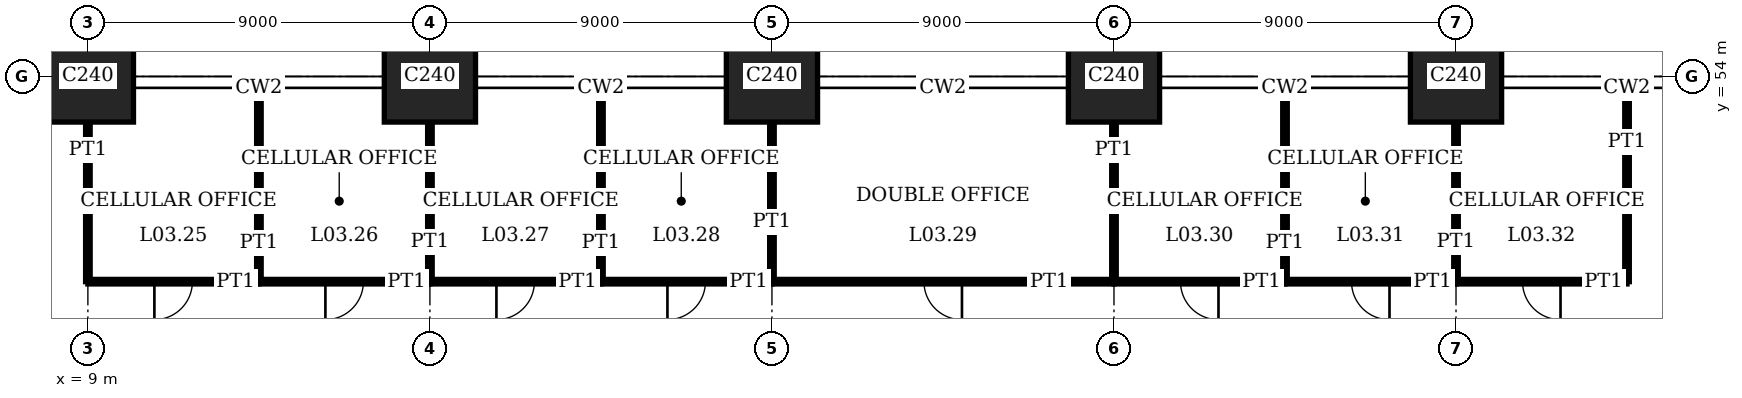
"""IFC4 building model, lengths in metres.
Left out: names, types, materials, properties, quantities, classifications, styles, units other than length and angle.
Written with IfcOpenShell. Run it as: python <this file> out.ifc"""

import sys

from ifc_helpers import new_model, si_unit, direction, frame, frame_2d, origin, origin_2d, place, context, subcontext, project, spatial, rectangle, extrude, element, fill, save


model = new_model("IFC4")
c1 = context("Model", 3, precision=1e-05, world=origin(), true_north=direction((0.0, 1.0)))
c2 = subcontext(c1, "Body", "Model", "MODEL_VIEW")
j1 = project(units=[si_unit("LENGTHUNIT", "METRE"), si_unit("PLANEANGLEUNIT", "RADIAN")], contexts=[c1])
p1 = place(None, origin())
s1 = spatial("IfcSite", under=j1, at=p1, CompositionType="ELEMENT")
p2 = place(p1, origin())
s2 = spatial("IfcBuilding", under=s1, at=p2, CompositionType="ELEMENT")
p3 = place(p2, frame((0.0, 0.0, 15.8)))
s3 = spatial("IfcBuildingStorey", under=s2, at=p3, CompositionType="ELEMENT", Elevation=15.8)
for number, where, z_axis, x_axis in (
    (1, (9.0, 54.0, 0.0), (0.0, 0.0, 1.0), (1.0, 0.0, 0.0)),
    (2, (18.0, 54.0, 0.0), (0.0, 0.0, 1.0), (1.0, 0.0, 0.0)),
    (3, (27.0, 54.0, 0.0), (0.0, 0.0, 1.0), (1.0, 0.0, 0.0)),
    (4, (36.0, 54.0, 0.0), (0.0, 0.0, 1.0), (1.0, 0.0, 0.0)),
    (5, (45.0, 54.0, 0.0), (0.0, 0.0, 1.0), (1.0, 0.0, 0.0)),
):
    element("IfcColumn", number, at=place(p3, frame(where, z_axis=z_axis, x_axis=x_axis)), inside=s3, PredefinedType="COLUMN", context=c2, shape_type="SweptSolid", body=[
        extrude(rectangle(XDim=2.4, YDim=2.4, at=origin_2d()), origin(), (0.0, 0.0, 1.0), 4.0),
    ])
p4 = place(p3, frame((9.0, 48.6, 0.0), z_axis=(0.0, 0.0, 1.0), x_axis=(1.0, 0.0, 0.0)))
e6 = element("IfcWall", 6, at=p4, inside=s3, PredefinedType="PARTITIONING", context=c2, shape_type="SweptSolid", body=[
    extrude(rectangle(XDim=4.5, YDim=0.12, at=frame_2d((2.25, 0.0))), origin(), (0.0, 0.0, 1.0), 3.75),
])
p5 = place(p4, frame((1.75, 0.0, 0.0)))
e7 = element("IfcOpeningElement", 7, at=p5, cuts=e6, PredefinedType="OPENING", context=c2, shape_type="SweptSolid", body=[
    extrude(rectangle(XDim=1.0, YDim=2.4, at=frame_2d((0.5, 1.2))), frame((0.0, 0.07, 0.0), z_axis=(0.0, -1.0, 0.0), x_axis=(1.0, 0.0, 0.0)), (0.0, 0.0, 1.0), 0.14),
])
p6 = place(p3, frame((13.5, 48.6, 0.0), z_axis=(0.0, 0.0, 1.0), x_axis=(1.0, 0.0, 0.0)))
e8 = element("IfcWall", 8, at=p6, inside=s3, PredefinedType="PARTITIONING", context=c2, shape_type="SweptSolid", body=[
    extrude(rectangle(XDim=4.5, YDim=0.12, at=frame_2d((2.25, 0.0))), origin(), (0.0, 0.0, 1.0), 3.75),
])
p7 = place(p6, frame((1.75, 0.0, 0.0)))
e9 = element("IfcOpeningElement", 9, at=p7, cuts=e8, PredefinedType="OPENING", context=c2, shape_type="SweptSolid", body=[
    extrude(rectangle(XDim=1.0, YDim=2.4, at=frame_2d((0.5, 1.2))), frame((0.0, 0.07, 0.0), z_axis=(0.0, -1.0, 0.0), x_axis=(1.0, 0.0, 0.0)), (0.0, 0.0, 1.0), 0.14),
])
p8 = place(p3, frame((18.0, 48.6, 0.0), z_axis=(0.0, 0.0, 1.0), x_axis=(1.0, 0.0, 0.0)))
e10 = element("IfcWall", 10, at=p8, inside=s3, PredefinedType="PARTITIONING", context=c2, shape_type="SweptSolid", body=[
    extrude(rectangle(XDim=4.5, YDim=0.12, at=frame_2d((2.25, 0.0))), origin(), (0.0, 0.0, 1.0), 3.75),
])
p9 = place(p8, frame((1.75, 0.0, 0.0)))
e11 = element("IfcOpeningElement", 11, at=p9, cuts=e10, PredefinedType="OPENING", context=c2, shape_type="SweptSolid", body=[
    extrude(rectangle(XDim=1.0, YDim=2.4, at=frame_2d((0.5, 1.2))), frame((0.0, 0.07, 0.0), z_axis=(0.0, -1.0, 0.0), x_axis=(1.0, 0.0, 0.0)), (0.0, 0.0, 1.0), 0.14),
])
p10 = place(p3, frame((22.5, 48.6, 0.0), z_axis=(0.0, 0.0, 1.0), x_axis=(1.0, 0.0, 0.0)))
e12 = element("IfcWall", 12, at=p10, inside=s3, PredefinedType="PARTITIONING", context=c2, shape_type="SweptSolid", body=[
    extrude(rectangle(XDim=4.5, YDim=0.12, at=frame_2d((2.25, 0.0))), origin(), (0.0, 0.0, 1.0), 3.75),
])
p11 = place(p10, frame((1.75, 0.0, 0.0)))
e13 = element("IfcOpeningElement", 13, at=p11, cuts=e12, PredefinedType="OPENING", context=c2, shape_type="SweptSolid", body=[
    extrude(rectangle(XDim=1.0, YDim=2.4, at=frame_2d((0.5, 1.2))), frame((0.0, 0.07, 0.0), z_axis=(0.0, -1.0, 0.0), x_axis=(1.0, 0.0, 0.0)), (0.0, 0.0, 1.0), 0.14),
])
p12 = place(p3, frame((27.0, 48.6, 0.0), z_axis=(0.0, 0.0, 1.0), x_axis=(1.0, 0.0, 0.0)))
e14 = element("IfcWall", 14, at=p12, inside=s3, PredefinedType="PARTITIONING", context=c2, shape_type="SweptSolid", body=[
    extrude(rectangle(XDim=9.0, YDim=0.12, at=frame_2d((4.5, 0.0))), origin(), (0.0, 0.0, 1.0), 3.75),
])
p13 = place(p12, frame((4.0, 0.0, 0.0)))
e15 = element("IfcOpeningElement", 15, at=p13, cuts=e14, PredefinedType="OPENING", context=c2, shape_type="SweptSolid", body=[
    extrude(rectangle(XDim=1.0, YDim=2.4, at=frame_2d((0.5, 1.2))), frame((0.0, 0.07, 0.0), z_axis=(0.0, -1.0, 0.0), x_axis=(1.0, 0.0, 0.0)), (0.0, 0.0, 1.0), 0.14),
])
p14 = place(p3, frame((36.0, 48.6, 0.0), z_axis=(0.0, 0.0, 1.0), x_axis=(1.0, 0.0, 0.0)))
e16 = element("IfcWall", 16, at=p14, inside=s3, PredefinedType="PARTITIONING", context=c2, shape_type="SweptSolid", body=[
    extrude(rectangle(XDim=4.5, YDim=0.12, at=frame_2d((2.25, 0.0))), origin(), (0.0, 0.0, 1.0), 3.75),
])
p15 = place(p14, frame((1.75, 0.0, 0.0)))
e17 = element("IfcOpeningElement", 17, at=p15, cuts=e16, PredefinedType="OPENING", context=c2, shape_type="SweptSolid", body=[
    extrude(rectangle(XDim=1.0, YDim=2.4, at=frame_2d((0.5, 1.2))), frame((0.0, 0.07, 0.0), z_axis=(0.0, -1.0, 0.0), x_axis=(1.0, 0.0, 0.0)), (0.0, 0.0, 1.0), 0.14),
])
p16 = place(p3, frame((40.5, 48.6, 0.0), z_axis=(0.0, 0.0, 1.0), x_axis=(1.0, 0.0, 0.0)))
e18 = element("IfcWall", 18, at=p16, inside=s3, PredefinedType="PARTITIONING", context=c2, shape_type="SweptSolid", body=[
    extrude(rectangle(XDim=4.5, YDim=0.12, at=frame_2d((2.25, 0.0))), origin(), (0.0, 0.0, 1.0), 3.75),
])
p17 = place(p16, frame((1.75, 0.0, 0.0)))
e19 = element("IfcOpeningElement", 19, at=p17, cuts=e18, PredefinedType="OPENING", context=c2, shape_type="SweptSolid", body=[
    extrude(rectangle(XDim=1.0, YDim=2.4, at=frame_2d((0.5, 1.2))), frame((0.0, 0.07, 0.0), z_axis=(0.0, -1.0, 0.0), x_axis=(1.0, 0.0, 0.0)), (0.0, 0.0, 1.0), 0.14),
])
p18 = place(p3, frame((45.0, 48.6, 0.0), z_axis=(0.0, 0.0, 1.0), x_axis=(1.0, 0.0, 0.0)))
e20 = element("IfcWall", 20, at=p18, inside=s3, PredefinedType="PARTITIONING", context=c2, shape_type="SweptSolid", body=[
    extrude(rectangle(XDim=4.5, YDim=0.12, at=frame_2d((2.25, 0.0))), origin(), (0.0, 0.0, 1.0), 3.75),
])
p19 = place(p18, frame((1.75, 0.0, 0.0)))
e21 = element("IfcOpeningElement", 21, at=p19, cuts=e20, PredefinedType="OPENING", context=c2, shape_type="SweptSolid", body=[
    extrude(rectangle(XDim=1.0, YDim=2.4, at=frame_2d((0.5, 1.2))), frame((0.0, 0.07, 0.0), z_axis=(0.0, -1.0, 0.0), x_axis=(1.0, 0.0, 0.0)), (0.0, 0.0, 1.0), 0.14),
])
p20 = place(p3, frame((9.0, 48.6, 0.0), z_axis=(0.0, 0.0, 1.0), x_axis=(0.0, 1.0, 0.0)))
e22 = element("IfcWall", 22, at=p20, inside=s3, PredefinedType="PARTITIONING", context=c2, shape_type="SweptSolid", body=[
    extrude(rectangle(XDim=4.2, YDim=0.12, at=frame_2d((2.1, 0.0))), origin(), (0.0, 0.0, 1.0), 3.05),
])
p21 = place(p3, frame((13.5, 48.6, 0.0), z_axis=(0.0, 0.0, 1.0), x_axis=(0.0, 1.0, 0.0)))
e23 = element("IfcWall", 23, at=p21, inside=s3, PredefinedType="PARTITIONING", context=c2, shape_type="SweptSolid", body=[
    extrude(rectangle(XDim=5.09, YDim=0.12, at=frame_2d((2.545, 0.0))), origin(), (0.0, 0.0, 1.0), 3.75),
])
p22 = place(p3, frame((18.0, 48.6, 0.0), z_axis=(0.0, 0.0, 1.0), x_axis=(0.0, 1.0, 0.0)))
e24 = element("IfcWall", 24, at=p22, inside=s3, PredefinedType="PARTITIONING", context=c2, shape_type="SweptSolid", body=[
    extrude(rectangle(XDim=4.2, YDim=0.12, at=frame_2d((2.1, 0.0))), origin(), (0.0, 0.0, 1.0), 3.05),
])
p23 = place(p3, frame((22.5, 48.6, 0.0), z_axis=(0.0, 0.0, 1.0), x_axis=(0.0, 1.0, 0.0)))
e25 = element("IfcWall", 25, at=p23, inside=s3, PredefinedType="PARTITIONING", context=c2, shape_type="SweptSolid", body=[
    extrude(rectangle(XDim=5.09, YDim=0.12, at=frame_2d((2.545, 0.0))), origin(), (0.0, 0.0, 1.0), 3.75),
])
for number, where, z_axis, x_axis in (
    (26, (27.0, 48.6, 0.0), (0.0, 0.0, 1.0), (0.0, 1.0, 0.0)),
    (27, (36.0, 48.6, 0.0), (0.0, 0.0, 1.0), (0.0, 1.0, 0.0)),
):
    element("IfcWall", number, at=place(p3, frame(where, z_axis=z_axis, x_axis=x_axis)), inside=s3, PredefinedType="PARTITIONING", context=c2, shape_type="SweptSolid", body=[
        extrude(rectangle(XDim=4.2, YDim=0.12, at=frame_2d((2.1, 0.0))), origin(), (0.0, 0.0, 1.0), 3.05),
    ])
p24 = place(p3, frame((40.5, 48.6, 0.0), z_axis=(0.0, 0.0, 1.0), x_axis=(0.0, 1.0, 0.0)))
e28 = element("IfcWall", 28, at=p24, inside=s3, PredefinedType="PARTITIONING", context=c2, shape_type="SweptSolid", body=[
    extrude(rectangle(XDim=5.09, YDim=0.12, at=frame_2d((2.545, 0.0))), origin(), (0.0, 0.0, 1.0), 3.75),
])
p25 = place(p3, frame((45.0, 48.6, 0.0), z_axis=(0.0, 0.0, 1.0), x_axis=(0.0, 1.0, 0.0)))
e29 = element("IfcWall", 29, at=p25, inside=s3, PredefinedType="PARTITIONING", context=c2, shape_type="SweptSolid", body=[
    extrude(rectangle(XDim=4.2, YDim=0.12, at=frame_2d((2.1, 0.0))), origin(), (0.0, 0.0, 1.0), 3.05),
])
p26 = place(p3, frame((49.5, 48.6, 0.0), z_axis=(0.0, 0.0, 1.0), x_axis=(0.0, 1.0, 0.0)))
e30 = element("IfcWall", 30, at=p26, inside=s3, PredefinedType="PARTITIONING", context=c2, shape_type="SweptSolid", body=[
    extrude(rectangle(XDim=5.09, YDim=0.12, at=frame_2d((2.545, 0.0))), origin(), (0.0, 0.0, 1.0), 3.75),
])
p27 = place(p5, origin())
e31 = element("IfcDoor", 31, at=p27, inside=s3, OperationType="SINGLE_SWING_LEFT", PredefinedType="DOOR", context=c2, shape_type="SweptSolid", body=[
    extrude(rectangle(XDim=1.0, YDim=2.4, at=frame_2d((0.5, 1.2))), frame((0.0, 0.025, 0.0), z_axis=(0.0, -1.0, 0.0), x_axis=(1.0, 0.0, 0.0)), (0.0, 0.0, 1.0), 0.05),
])
fill(e7, e31)
p28 = place(p7, origin())
e32 = element("IfcDoor", 32, at=p28, inside=s3, OperationType="SINGLE_SWING_LEFT", PredefinedType="DOOR", context=c2, shape_type="SweptSolid", body=[
    extrude(rectangle(XDim=1.0, YDim=2.4, at=frame_2d((0.5, 1.2))), frame((0.0, 0.025, 0.0), z_axis=(0.0, -1.0, 0.0), x_axis=(1.0, 0.0, 0.0)), (0.0, 0.0, 1.0), 0.05),
])
fill(e9, e32)
p29 = place(p9, origin())
e33 = element("IfcDoor", 33, at=p29, inside=s3, OperationType="SINGLE_SWING_LEFT", PredefinedType="DOOR", context=c2, shape_type="SweptSolid", body=[
    extrude(rectangle(XDim=1.0, YDim=2.4, at=frame_2d((0.5, 1.2))), frame((0.0, 0.025, 0.0), z_axis=(0.0, -1.0, 0.0), x_axis=(1.0, 0.0, 0.0)), (0.0, 0.0, 1.0), 0.05),
])
fill(e11, e33)
p30 = place(p11, origin())
e34 = element("IfcDoor", 34, at=p30, inside=s3, OperationType="SINGLE_SWING_LEFT", PredefinedType="DOOR", context=c2, shape_type="SweptSolid", body=[
    extrude(rectangle(XDim=1.0, YDim=2.4, at=frame_2d((0.5, 1.2))), frame((0.0, 0.025, 0.0), z_axis=(0.0, -1.0, 0.0), x_axis=(1.0, 0.0, 0.0)), (0.0, 0.0, 1.0), 0.05),
])
fill(e13, e34)
p31 = place(p13, origin())
e35 = element("IfcDoor", 35, at=p31, inside=s3, OperationType="SINGLE_SWING_RIGHT", PredefinedType="DOOR", context=c2, shape_type="SweptSolid", body=[
    extrude(rectangle(XDim=1.0, YDim=2.4, at=frame_2d((0.5, 1.2))), frame((0.0, 0.025, 0.0), z_axis=(0.0, -1.0, 0.0), x_axis=(1.0, 0.0, 0.0)), (0.0, 0.0, 1.0), 0.05),
])
fill(e15, e35)
p32 = place(p15, origin())
e36 = element("IfcDoor", 36, at=p32, inside=s3, OperationType="SINGLE_SWING_RIGHT", PredefinedType="DOOR", context=c2, shape_type="SweptSolid", body=[
    extrude(rectangle(XDim=1.0, YDim=2.4, at=frame_2d((0.5, 1.2))), frame((0.0, 0.025, 0.0), z_axis=(0.0, -1.0, 0.0), x_axis=(1.0, 0.0, 0.0)), (0.0, 0.0, 1.0), 0.05),
])
fill(e17, e36)
p33 = place(p17, origin())
e37 = element("IfcDoor", 37, at=p33, inside=s3, OperationType="SINGLE_SWING_RIGHT", PredefinedType="DOOR", context=c2, shape_type="SweptSolid", body=[
    extrude(rectangle(XDim=1.0, YDim=2.4, at=frame_2d((0.5, 1.2))), frame((0.0, 0.025, 0.0), z_axis=(0.0, -1.0, 0.0), x_axis=(1.0, 0.0, 0.0)), (0.0, 0.0, 1.0), 0.05),
])
fill(e19, e37)
p34 = place(p19, origin())
e38 = element("IfcDoor", 38, at=p34, inside=s3, OperationType="SINGLE_SWING_RIGHT", PredefinedType="DOOR", context=c2, shape_type="SweptSolid", body=[
    extrude(rectangle(XDim=1.0, YDim=2.4, at=frame_2d((0.5, 1.2))), frame((0.0, 0.025, 0.0), z_axis=(0.0, -1.0, 0.0), x_axis=(1.0, 0.0, 0.0)), (0.0, 0.0, 1.0), 0.05),
])
fill(e21, e38)
save(model, sys.argv[1])
